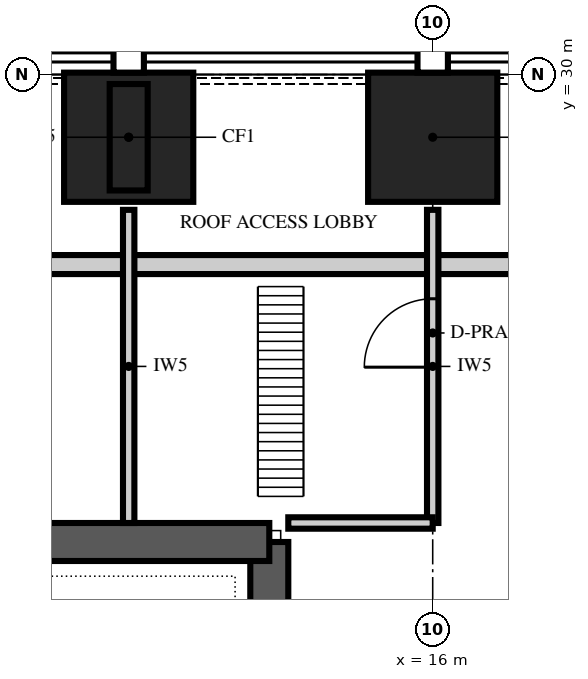
"""IFC4 building model, lengths in metres.
Left out: names, types, materials, properties, quantities, classifications, styles, units other than length and angle.
Written with IfcOpenShell. Run it as: python <this file> out.ifc"""

import sys

from ifc_helpers import new_model, si_unit, direction, frame, frame_2d, origin, origin_2d, place, context, subcontext, project, spatial, polyline, rectangle, hollow_rectangle, outline, extrude, element, fill, save


model = new_model("IFC4")
c1 = context("Model", 3, precision=1e-05, world=origin(), true_north=direction((0.0, 1.0)))
c2 = subcontext(c1, "Body", "Model", "MODEL_VIEW")
j1 = project(units=[si_unit("LENGTHUNIT", "METRE"), si_unit("PLANEANGLEUNIT", "RADIAN")], contexts=[c1])
p1 = place(None, origin())
s1 = spatial("IfcSite", under=j1, at=p1, CompositionType="ELEMENT")
p2 = place(p1, origin())
s2 = spatial("IfcBuilding", under=s1, at=p2, CompositionType="ELEMENT")
p3 = place(p2, frame((0.0, 0.0, 324.0)))
s3 = spatial("IfcBuildingStorey", under=s2, at=p3, CompositionType="ELEMENT", Elevation=324.0)
for number, where, z_axis, x_axis in (
    (1, (16.0, 29.175, 0.0), (0.0, 0.0, 1.0), (-1.0, 0.0, 0.0)),
    (2, (12.0, 29.175, 0.0), (0.0, 0.0, 1.0), (-1.0, 0.0, 0.0)),
):
    element("IfcColumn", number, at=place(p3, frame(where, z_axis=z_axis, x_axis=x_axis)), inside=s3, PredefinedType="COLUMN", context=c2, shape_type="SweptSolid", body=[
        extrude(rectangle(XDim=1.7, YDim=1.7, at=origin_2d()), origin(), (0.0, 0.0, 1.0), 6.0),
    ])
p4 = place(p3, frame((13.85, 6.15, 0.0), z_axis=(0.0, 0.0, 1.0), x_axis=(0.0, 1.0, 0.0)))
e3 = element("IfcWall", 3, at=p4, inside=s3, PredefinedType="SHEAR", context=c2, shape_type="SweptSolid", body=[
    extrude(outline(polyline([(0.0, -0.25), (17.7, -0.25), (17.7, 0.0), (17.45, 0.0), (17.45, 0.25), (0.25, 0.25), (0.25, 0.0), (0.0, 0.0), (0.0, -0.25)])), origin(), (0.0, 0.0, 1.0), 6.0),
])
p5 = place(p4, frame((4.15, 0.0, 0.0)))
e4 = element("IfcOpeningElement", 4, at=p5, cuts=e3, PredefinedType="OPENING", context=c2, shape_type="SweptSolid", body=[
    extrude(rectangle(XDim=1.8, YDim=2.4, at=frame_2d((0.9, 1.2))), frame((0.0, 0.265, 0.0), z_axis=(0.0, -1.0, 0.0), x_axis=(1.0, 0.0, 0.0)), (0.0, 0.0, 1.0), 0.53),
])
p6 = place(p3, frame((13.85, 23.85, 0.0), z_axis=(0.0, 0.0, 1.0), x_axis=(-1.0, 0.0, 0.0)))
e5 = element("IfcWall", 5, at=p6, inside=s3, PredefinedType="SHEAR", context=c2, shape_type="SweptSolid", body=[
    extrude(rectangle(XDim=27.7, YDim=0.5, at=frame_2d((13.85, 0.0))), origin(), (0.0, 0.0, 1.0), 6.0),
])
p7 = place(p6, frame((21.75, 0.0, 0.0)))
e6 = element("IfcOpeningElement", 6, at=p7, cuts=e5, PredefinedType="OPENING", context=c2, shape_type="SweptSolid", body=[
    extrude(rectangle(XDim=1.0, YDim=2.1, at=frame_2d((0.5, 1.05))), frame((0.0, 0.265, 0.0), z_axis=(0.0, -1.0, 0.0), x_axis=(1.0, 0.0, 0.0)), (0.0, 0.0, 1.0), 0.53),
])
p8 = place(p6, frame((4.95, 0.0, 0.0)))
e7 = element("IfcOpeningElement", 7, at=p8, cuts=e5, PredefinedType="OPENING", context=c2, shape_type="SweptSolid", body=[
    extrude(rectangle(XDim=1.0, YDim=2.1, at=frame_2d((0.5, 1.05))), frame((0.0, 0.265, 0.0), z_axis=(0.0, -1.0, 0.0), x_axis=(1.0, 0.0, 0.0)), (0.0, 0.0, 1.0), 0.53),
])
p9 = place(p6, frame((17.35, 0.0, 0.0)))
e8 = element("IfcOpeningElement", 8, at=p9, cuts=e5, PredefinedType="OPENING", context=c2, shape_type="SweptSolid", body=[
    extrude(rectangle(XDim=1.0, YDim=2.1, at=frame_2d((0.5, 1.05))), frame((0.0, 0.265, 0.0), z_axis=(0.0, -1.0, 0.0), x_axis=(1.0, 0.0, 0.0)), (0.0, 0.0, 1.0), 0.53),
])
p10 = place(p6, frame((13.35, 0.0, 0.0)))
e9 = element("IfcOpeningElement", 9, at=p10, cuts=e5, PredefinedType="OPENING", context=c2, shape_type="SweptSolid", body=[
    extrude(rectangle(XDim=1.0, YDim=2.1, at=frame_2d((0.5, 1.05))), frame((0.0, 0.265, 0.0), z_axis=(0.0, -1.0, 0.0), x_axis=(1.0, 0.0, 0.0)), (0.0, 0.0, 1.0), 0.53),
])
p11 = place(p6, frame((9.35, 0.0, 0.0)))
e10 = element("IfcOpeningElement", 10, at=p11, cuts=e5, PredefinedType="OPENING", context=c2, shape_type="SweptSolid", body=[
    extrude(rectangle(XDim=1.0, YDim=2.1, at=frame_2d((0.5, 1.05))), frame((0.0, 0.265, 0.0), z_axis=(0.0, -1.0, 0.0), x_axis=(1.0, 0.0, 0.0)), (0.0, 0.0, 1.0), 0.53),
])
p12 = place(p3, frame((12.0, 29.175, 6.0), z_axis=(0.0, 0.0, 1.0), x_axis=(-1.0, 0.0, 0.0)))
e11 = element("IfcColumn", 11, at=p12, inside=s3, PredefinedType="COLUMN", context=c2, shape_type="SweptSolid", body=[
    extrude(hollow_rectangle(XDim=0.5, YDim=1.4, WallThickness=0.04, at=origin_2d()), origin(), (0.0, 0.0, 1.0), 24.0),
])
p13 = place(p3, frame((19.327, 27.5, 6.0), z_axis=(0.0, 0.0, 1.0), x_axis=(-1.0, 0.0, 0.0)))
e12 = element("IfcWall", 12, at=p13, inside=s3, PredefinedType="PARAPET", context=c2, shape_type="SweptSolid", body=[
    extrude(rectangle(XDim=38.653, YDim=0.25, at=frame_2d((19.327, 0.0))), origin(), (0.0, 0.0, 1.0), 1.1),
])
p14 = place(p3, frame((12.0, 24.1, 0.0), z_axis=(0.0, 0.0, 1.0), x_axis=(0.0, 1.0, 0.0)))
e13 = element("IfcWall", 13, at=p14, inside=s3, PredefinedType="PARTITIONING", context=c2, shape_type="SweptSolid", body=[
    extrude(rectangle(XDim=4.12, YDim=0.15, at=frame_2d((2.06, 0.0))), origin(), (0.0, 0.0, 1.0), 5.75),
])
p15 = place(p3, frame((16.0, 24.1, 0.0), z_axis=(0.0, 0.0, 1.0), x_axis=(0.0, 1.0, 0.0)))
e14 = element("IfcWall", 14, at=p15, inside=s3, PredefinedType="PARTITIONING", context=c2, shape_type="SweptSolid", body=[
    extrude(rectangle(XDim=4.12, YDim=0.15, at=frame_2d((2.06, 0.0))), origin(), (0.0, 0.0, 1.0), 5.318),
])
p16 = place(p15, frame((2.05, 0.0, 0.0)))
e15 = element("IfcOpeningElement", 15, at=p16, cuts=e14, PredefinedType="OPENING", context=c2, shape_type="SweptSolid", body=[
    extrude(rectangle(XDim=0.9, YDim=2.1, at=frame_2d((0.45, 1.05))), frame((0.0, 0.09, 0.0), z_axis=(0.0, -1.0, 0.0), x_axis=(1.0, 0.0, 0.0)), (0.0, 0.0, 1.0), 0.18),
])
p17 = place(p3, frame((14.1, 24.1, 0.0), z_axis=(0.0, 0.0, 1.0), x_axis=(1.0, 0.0, 0.0)))
e16 = element("IfcWall", 16, at=p17, inside=s3, PredefinedType="PARTITIONING", context=c2, shape_type="SweptSolid", body=[
    extrude(rectangle(XDim=1.9, YDim=0.15, at=frame_2d((0.95, 0.0))), origin(), (0.0, 0.0, 1.0), 5.75),
])
p18 = place(p16, origin())
e17 = element("IfcDoor", 17, at=p18, inside=s3, OperationType="SINGLE_SWING_LEFT", PredefinedType="DOOR", context=c2, shape_type="SweptSolid", body=[
    extrude(rectangle(XDim=0.9, YDim=2.1, at=frame_2d((0.45, 1.05))), frame((0.0, 0.075, 0.0), z_axis=(0.0, -1.0, 0.0), x_axis=(1.0, 0.0, 0.0)), (0.0, 0.0, 1.0), 0.149),
])
fill(e15, e17)
save(model, sys.argv[1])
